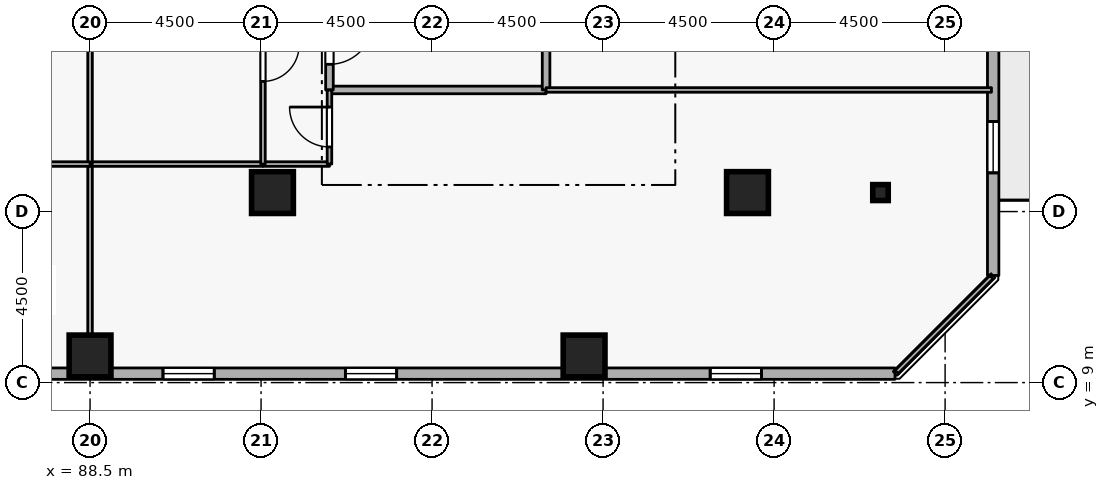
"""IFC4 building model, lengths in metres.
Left out: names, types, materials, properties, quantities, classifications, styles, units other than length and angle.
Written with IfcOpenShell. Run it as: python <this file> out.ifc"""

import sys

from ifc_helpers import new_model, si_unit, direction, frame, frame_2d, origin, origin_2d, place, context, subcontext, project, spatial, rectangle, i_section, extrude, element, fill, save


model = new_model("IFC4")
c1 = context("Model", 3, precision=1e-05, world=origin(), true_north=direction((0.0, 1.0)))
c2 = subcontext(c1, "Body", "Model", "MODEL_VIEW")
j1 = project(units=[si_unit("LENGTHUNIT", "METRE"), si_unit("PLANEANGLEUNIT", "RADIAN")], contexts=[c1])
p1 = place(None, origin())
s1 = spatial("IfcSite", under=j1, at=p1, CompositionType="ELEMENT")
p2 = place(p1, origin())
s2 = spatial("IfcBuilding", under=s1, at=p2, CompositionType="ELEMENT")
p3 = place(p2, frame((0.0, 0.0, 170.7)))
s3 = spatial("IfcBuildingStorey", under=s2, at=p3, CompositionType="ELEMENT", Elevation=170.7)
for number, where, z_axis, x_axis in (
    (1, (105.8, 14.0, 0.0), (0.0, 0.0, 1.0), (1.0, 0.0, 0.0)),
    (2, (101.5, 9.7, 0.0), (0.0, 0.0, 1.0), (1.0, 0.0, 0.0)),
    (3, (88.5, 9.7, 0.0), (0.0, 0.0, 1.0), (1.0, 0.0, 0.0)),
    (4, (93.3, 14.0, 0.0), (0.0, 0.0, 1.0), (1.0, 0.0, 0.0)),
):
    element("IfcColumn", number, at=place(p3, frame(where, z_axis=z_axis, x_axis=x_axis)), inside=s3, PredefinedType="COLUMN", context=c2, shape_type="SweptSolid", body=[
        extrude(rectangle(XDim=1.1, YDim=1.1, at=origin_2d()), origin(), (0.0, 0.0, 1.0), 3.6),
    ])
p4 = place(p3, frame((109.3, 14.0, 0.0), z_axis=(0.0, 0.0, 1.0), x_axis=(1.0, 0.0, 0.0)))
e5 = element("IfcColumn", 5, at=p4, inside=s3, PredefinedType="COLUMN", context=c2, shape_type="SweptSolid", body=[
    extrude(i_section(OverallWidth=0.407, OverallDepth=0.419, WebThickness=0.031, FlangeThickness=0.049, FilletRadius=0.015, at=origin_2d()), origin(), (0.0, 0.0, 1.0), 3.6),
])
p5 = place(p3, frame((73.319, 9.235, 0.0), z_axis=(0.0, 0.0, 1.0), x_axis=(1.0, 0.0, 0.0)))
e6 = element("IfcWall", 6, at=p5, inside=s3, PredefinedType="STANDARD", context=c2, shape_type="SweptSolid", body=[
    extrude(rectangle(XDim=36.363, YDim=0.3, at=frame_2d((18.181, 0.0))), origin(), (0.0, 0.0, 1.0), 2.22),
])
p6 = place(p5, frame((7.5, 0.0, 0.72)))
e7 = element("IfcOpeningElement", 7, at=p6, cuts=e6, PredefinedType="OPENING", context=c2, shape_type="SweptSolid", body=[
    extrude(rectangle(XDim=1.35, YDim=1.05, at=frame_2d((0.675, 0.525))), frame((0.0, 0.16, 0.0), z_axis=(0.0, -1.0, 0.0), x_axis=(1.0, 0.0, 0.0)), (0.0, 0.0, 1.0), 0.32),
])
p7 = place(p5, frame((12.3, 0.0, 0.72)))
e8 = element("IfcOpeningElement", 8, at=p7, cuts=e6, PredefinedType="OPENING", context=c2, shape_type="SweptSolid", body=[
    extrude(rectangle(XDim=1.35, YDim=1.05, at=frame_2d((0.675, 0.525))), frame((0.0, 0.16, 0.0), z_axis=(0.0, -1.0, 0.0), x_axis=(1.0, 0.0, 0.0)), (0.0, 0.0, 1.0), 0.32),
])
p8 = place(p5, frame((17.1, 0.0, 0.72)))
e9 = element("IfcOpeningElement", 9, at=p8, cuts=e6, PredefinedType="OPENING", context=c2, shape_type="SweptSolid", body=[
    extrude(rectangle(XDim=1.35, YDim=1.05, at=frame_2d((0.675, 0.525))), frame((0.0, 0.16, 0.0), z_axis=(0.0, -1.0, 0.0), x_axis=(1.0, 0.0, 0.0)), (0.0, 0.0, 1.0), 0.32),
])
p9 = place(p5, frame((21.9, 0.0, 0.72)))
e10 = element("IfcOpeningElement", 10, at=p9, cuts=e6, PredefinedType="OPENING", context=c2, shape_type="SweptSolid", body=[
    extrude(rectangle(XDim=1.35, YDim=1.05, at=frame_2d((0.675, 0.525))), frame((0.0, 0.16, 0.0), z_axis=(0.0, -1.0, 0.0), x_axis=(1.0, 0.0, 0.0)), (0.0, 0.0, 1.0), 0.32),
])
p10 = place(p5, frame((31.5, 0.0, 0.72)))
e11 = element("IfcOpeningElement", 11, at=p10, cuts=e6, PredefinedType="OPENING", context=c2, shape_type="SweptSolid", body=[
    extrude(rectangle(XDim=1.35, YDim=1.05, at=frame_2d((0.675, 0.525))), frame((0.0, 0.16, 0.0), z_axis=(0.0, -1.0, 0.0), x_axis=(1.0, 0.0, 0.0)), (0.0, 0.0, 1.0), 0.32),
])
p11 = place(p3, frame((112.265, 11.819, 0.0), z_axis=(0.0, 0.0, 1.0), x_axis=(0.0, 1.0, 0.0)))
e12 = element("IfcWall", 12, at=p11, inside=s3, PredefinedType="STANDARD", context=c2, shape_type="SweptSolid", body=[
    extrude(rectangle(XDim=36.363, YDim=0.3, at=frame_2d((18.181, 0.0))), origin(), (0.0, 0.0, 1.0), 2.22),
])
p12 = place(p11, frame((23.581, 0.0, 0.0)))
e13 = element("IfcOpeningElement", 13, at=p12, cuts=e12, PredefinedType="OPENING", context=c2, shape_type="SweptSolid", body=[
    extrude(rectangle(XDim=1.0, YDim=2.08, at=frame_2d((0.5, 1.04))), frame((0.0, 0.16, 0.0), z_axis=(0.0, -1.0, 0.0), x_axis=(1.0, 0.0, 0.0)), (0.0, 0.0, 1.0), 0.32),
])
p13 = place(p11, frame((2.7, 0.0, 0.72)))
e14 = element("IfcOpeningElement", 14, at=p13, cuts=e12, PredefinedType="OPENING", context=c2, shape_type="SweptSolid", body=[
    extrude(rectangle(XDim=1.35, YDim=1.05, at=frame_2d((0.675, 0.525))), frame((0.0, 0.16, 0.0), z_axis=(0.0, -1.0, 0.0), x_axis=(1.0, 0.0, 0.0)), (0.0, 0.0, 1.0), 0.32),
])
p14 = place(p11, frame((7.5, 0.0, 0.72)))
e15 = element("IfcOpeningElement", 15, at=p14, cuts=e12, PredefinedType="OPENING", context=c2, shape_type="SweptSolid", body=[
    extrude(rectangle(XDim=1.35, YDim=1.05, at=frame_2d((0.675, 0.525))), frame((0.0, 0.16, 0.0), z_axis=(0.0, -1.0, 0.0), x_axis=(1.0, 0.0, 0.0)), (0.0, 0.0, 1.0), 0.32),
])
p15 = place(p11, frame((12.3, 0.0, 0.72)))
e16 = element("IfcOpeningElement", 16, at=p15, cuts=e12, PredefinedType="OPENING", context=c2, shape_type="SweptSolid", body=[
    extrude(rectangle(XDim=1.35, YDim=1.05, at=frame_2d((0.675, 0.525))), frame((0.0, 0.16, 0.0), z_axis=(0.0, -1.0, 0.0), x_axis=(1.0, 0.0, 0.0)), (0.0, 0.0, 1.0), 0.32),
])
p16 = place(p11, frame((17.1, 0.0, 0.72)))
e17 = element("IfcOpeningElement", 17, at=p16, cuts=e12, PredefinedType="OPENING", context=c2, shape_type="SweptSolid", body=[
    extrude(rectangle(XDim=1.35, YDim=1.05, at=frame_2d((0.675, 0.525))), frame((0.0, 0.16, 0.0), z_axis=(0.0, -1.0, 0.0), x_axis=(1.0, 0.0, 0.0)), (0.0, 0.0, 1.0), 0.32),
])
p17 = place(p11, frame((26.7, 0.0, 0.72)))
e18 = element("IfcOpeningElement", 18, at=p17, cuts=e12, PredefinedType="OPENING", context=c2, shape_type="SweptSolid", body=[
    extrude(rectangle(XDim=1.35, YDim=1.05, at=frame_2d((0.675, 0.525))), frame((0.0, 0.16, 0.0), z_axis=(0.0, -1.0, 0.0), x_axis=(1.0, 0.0, 0.0)), (0.0, 0.0, 1.0), 0.32),
])
p18 = place(p11, frame((31.5, 0.0, 0.72)))
e19 = element("IfcOpeningElement", 19, at=p18, cuts=e12, PredefinedType="OPENING", context=c2, shape_type="SweptSolid", body=[
    extrude(rectangle(XDim=1.35, YDim=1.05, at=frame_2d((0.675, 0.525))), frame((0.0, 0.16, 0.0), z_axis=(0.0, -1.0, 0.0), x_axis=(1.0, 0.0, 0.0)), (0.0, 0.0, 1.0), 0.32),
])
p19 = place(p3, frame((94.8, 16.7, 0.0), z_axis=(0.0, 0.0, 1.0), x_axis=(1.0, 0.0, 0.0)))
e20 = element("IfcWall", 20, at=p19, inside=s3, PredefinedType="STANDARD", context=c2, shape_type="SweptSolid", body=[
    extrude(rectangle(XDim=5.7, YDim=0.2, at=frame_2d((2.85, 0.0))), origin(), (0.0, 0.0, 1.0), 3.26),
])
p20 = place(p3, frame((100.5, 16.7, 0.0), z_axis=(0.0, 0.0, 1.0), x_axis=(0.0, 1.0, 0.0)))
e21 = element("IfcWall", 21, at=p20, inside=s3, PredefinedType="STANDARD", context=c2, shape_type="SweptSolid", body=[
    extrude(rectangle(XDim=2.5, YDim=0.2, at=frame_2d((1.25, 0.0))), origin(), (0.0, 0.0, 1.0), 3.26),
])
p21 = place(p3, frame((94.8, 19.2, 0.0), z_axis=(0.0, 0.0, 1.0), x_axis=(0.0, -1.0, 0.0)))
e22 = element("IfcWall", 22, at=p21, inside=s3, PredefinedType="STANDARD", context=c2, shape_type="SweptSolid", body=[
    extrude(rectangle(XDim=2.5, YDim=0.2, at=frame_2d((1.25, 0.0))), origin(), (0.0, 0.0, 1.0), 3.26),
])
p22 = place(p21, frame((0.675, 0.0, 0.0)))
e23 = element("IfcOpeningElement", 23, at=p22, cuts=e22, PredefinedType="OPENING", context=c2, shape_type="SweptSolid", body=[
    extrude(rectangle(XDim=1.15, YDim=2.1, at=frame_2d((0.575, 1.05))), frame((0.0, 0.11, 0.0), z_axis=(0.0, -1.0, 0.0), x_axis=(1.0, 0.0, 0.0)), (0.0, 0.0, 1.0), 0.22),
])
p23 = place(p3, frame((88.5, 9.28, 0.0), z_axis=(0.0, 0.0, 1.0), x_axis=(0.0, 1.0, 0.0)))
e24 = element("IfcWall", 24, at=p23, inside=s3, PredefinedType="PARTITIONING", context=c2, shape_type="SweptSolid", body=[
    extrude(rectangle(XDim=5.47, YDim=0.12, at=frame_2d((2.735, 0.0))), origin(), (0.0, 0.0, 1.0), 2.802),
])
p24 = place(p3, frame((88.5, 14.75, 0.0), z_axis=(0.0, 0.0, 1.0), x_axis=(1.0, 0.0, 0.0)))
e25 = element("IfcWall", 25, at=p24, inside=s3, PredefinedType="PARTITIONING", context=c2, shape_type="SweptSolid", body=[
    extrude(rectangle(XDim=4.55, YDim=0.12, at=frame_2d((2.275, 0.0))), origin(), (0.0, 0.0, 1.0), 3.26),
])
p25 = place(p3, frame((93.05, 14.75, 0.0), z_axis=(0.0, 0.0, 1.0), x_axis=(1.0, 0.0, 0.0)))
e26 = element("IfcWall", 26, at=p25, inside=s3, PredefinedType="PARTITIONING", context=c2, shape_type="SweptSolid", body=[
    extrude(rectangle(XDim=1.75, YDim=0.12, at=frame_2d((0.875, 0.0))), origin(), (0.0, 0.0, 1.0), 3.26),
])
p26 = place(p3, frame((94.8, 14.75, 0.0), z_axis=(0.0, 0.0, 1.0), x_axis=(0.0, 1.0, 0.0)))
e27 = element("IfcWall", 27, at=p26, inside=s3, PredefinedType="PARTITIONING", context=c2, shape_type="SweptSolid", body=[
    extrude(rectangle(XDim=1.95, YDim=0.12, at=frame_2d((0.975, 0.0))), origin(), (0.0, 0.0, 1.0), 3.26),
])
p27 = place(p26, frame((0.45, 0.0, 0.0)))
e28 = element("IfcOpeningElement", 28, at=p27, cuts=e27, PredefinedType="OPENING", context=c2, shape_type="SweptSolid", body=[
    extrude(rectangle(XDim=1.05, YDim=2.1, at=frame_2d((0.525, 1.05))), frame((0.0, 0.07, 0.0), z_axis=(0.0, -1.0, 0.0), x_axis=(1.0, 0.0, 0.0)), (0.0, 0.0, 1.0), 0.14),
])
p28 = place(p3, frame((100.5, 16.7, 0.0), z_axis=(0.0, 0.0, 1.0), x_axis=(1.0, 0.0, 0.0)))
e29 = element("IfcWall", 29, at=p28, inside=s3, PredefinedType="PARTITIONING", context=c2, shape_type="SweptSolid", body=[
    extrude(rectangle(XDim=11.72, YDim=0.12, at=frame_2d((5.86, 0.0))), origin(), (0.0, 0.0, 1.0), 3.26),
])
p29 = place(p3, frame((112.22, 11.775, 0.0), z_axis=(0.0, 0.0, 1.0), x_axis=(-0.707106781187, -0.707106781187, 0.0)))
e30 = element("IfcWall", 30, at=p29, inside=s3, PredefinedType="PARTITIONING", context=c2, shape_type="SweptSolid", body=[
    extrude(rectangle(XDim=3.528, YDim=0.12, at=frame_2d((1.764, 0.0))), origin(), (0.0, 0.0, 1.0), 3.26),
])
p30 = place(p3, frame((88.5, 14.75, 0.0), z_axis=(0.0, 0.0, 1.0), x_axis=(0.0, 1.0, 0.0)))
e31 = element("IfcWall", 31, at=p30, inside=s3, PredefinedType="PARTITIONING", context=c2, shape_type="SweptSolid", body=[
    extrude(rectangle(XDim=5.3, YDim=0.12, at=frame_2d((2.65, 0.0))), origin(), (0.0, 0.0, 1.0), 2.802),
])
p31 = place(p3, frame((93.05, 20.05, 0.0), z_axis=(0.0, 0.0, 1.0), x_axis=(0.0, -1.0, 0.0)))
e32 = element("IfcWall", 32, at=p31, inside=s3, PredefinedType="PARTITIONING", context=c2, shape_type="SweptSolid", body=[
    extrude(rectangle(XDim=5.3, YDim=0.12, at=frame_2d((2.65, 0.0))), origin(), (0.0, 0.0, 1.0), 3.26),
])
p32 = place(p31, frame((2.175, 0.0, 0.0)))
e33 = element("IfcOpeningElement", 33, at=p32, cuts=e32, PredefinedType="OPENING", context=c2, shape_type="SweptSolid", body=[
    extrude(rectangle(XDim=0.95, YDim=2.1, at=frame_2d((0.475, 1.05))), frame((0.0, 0.07, 0.0), z_axis=(0.0, -1.0, 0.0), x_axis=(1.0, 0.0, 0.0)), (0.0, 0.0, 1.0), 0.14),
])
p33 = place(p3, frame((88.5, 14.75, 0.0), z_axis=(0.0, 0.0, 1.0), x_axis=(-1.0, 0.0, 0.0)))
e34 = element("IfcWall", 34, at=p33, inside=s3, PredefinedType="PARTITIONING", context=c2, shape_type="SweptSolid", body=[
    extrude(rectangle(XDim=2.3, YDim=0.12, at=frame_2d((1.15, 0.0))), origin(), (0.0, 0.0, 1.0), 3.26),
])
p34 = place(p8, origin())
e35 = element("IfcWindow", 35, at=p34, inside=s3, PartitioningType="SINGLE_PANEL", PredefinedType="WINDOW", context=c2, shape_type="SweptSolid", body=[
    extrude(rectangle(XDim=1.35, YDim=1.05, at=frame_2d((0.675, 0.525))), frame((0.0, 0.03, 0.0), z_axis=(0.0, -1.0, 0.0), x_axis=(1.0, 0.0, 0.0)), (0.0, 0.0, 1.0), 0.06),
])
fill(e9, e35)
p35 = place(p9, origin())
e36 = element("IfcWindow", 36, at=p35, inside=s3, PartitioningType="SINGLE_PANEL", PredefinedType="WINDOW", context=c2, shape_type="SweptSolid", body=[
    extrude(rectangle(XDim=1.35, YDim=1.05, at=frame_2d((0.675, 0.525))), frame((0.0, 0.03, 0.0), z_axis=(0.0, -1.0, 0.0), x_axis=(1.0, 0.0, 0.0)), (0.0, 0.0, 1.0), 0.06),
])
fill(e10, e36)
p36 = place(p10, origin())
e37 = element("IfcWindow", 37, at=p36, inside=s3, PartitioningType="SINGLE_PANEL", PredefinedType="WINDOW", context=c2, shape_type="SweptSolid", body=[
    extrude(rectangle(XDim=1.35, YDim=1.05, at=frame_2d((0.675, 0.525))), frame((0.0, 0.03, 0.0), z_axis=(0.0, -1.0, 0.0), x_axis=(1.0, 0.0, 0.0)), (0.0, 0.0, 1.0), 0.06),
])
fill(e11, e37)
p37 = place(p13, origin())
e38 = element("IfcWindow", 38, at=p37, inside=s3, PartitioningType="SINGLE_PANEL", PredefinedType="WINDOW", context=c2, shape_type="SweptSolid", body=[
    extrude(rectangle(XDim=1.35, YDim=1.05, at=frame_2d((0.675, 0.525))), frame((0.0, 0.03, 0.0), z_axis=(0.0, -1.0, 0.0), x_axis=(1.0, 0.0, 0.0)), (0.0, 0.0, 1.0), 0.06),
])
fill(e14, e38)
p38 = place(p22, origin())
e39 = element("IfcDoor", 39, at=p38, inside=s3, OperationType="SINGLE_SWING_LEFT", PredefinedType="DOOR", context=c2, shape_type="SweptSolid", body=[
    extrude(rectangle(XDim=1.15, YDim=2.1, at=frame_2d((0.575, 1.05))), frame((0.0, 0.025, 0.0), z_axis=(0.0, -1.0, 0.0), x_axis=(1.0, 0.0, 0.0)), (0.0, 0.0, 1.0), 0.05),
])
fill(e23, e39)
p39 = place(p27, origin())
e40 = element("IfcDoor", 40, at=p39, inside=s3, OperationType="SINGLE_SWING_RIGHT", PredefinedType="DOOR", context=c2, shape_type="SweptSolid", body=[
    extrude(rectangle(XDim=1.05, YDim=2.1, at=frame_2d((0.525, 1.05))), frame((0.0, 0.025, 0.0), z_axis=(0.0, -1.0, 0.0), x_axis=(1.0, 0.0, 0.0)), (0.0, 0.0, 1.0), 0.05),
])
fill(e28, e40)
p40 = place(p32, origin())
e41 = element("IfcDoor", 41, at=p40, inside=s3, OperationType="SINGLE_SWING_LEFT", PredefinedType="DOOR", context=c2, shape_type="SweptSolid", body=[
    extrude(rectangle(XDim=0.95, YDim=2.1, at=frame_2d((0.475, 1.05))), frame((0.0, 0.025, 0.0), z_axis=(0.0, -1.0, 0.0), x_axis=(1.0, 0.0, 0.0)), (0.0, 0.0, 1.0), 0.05),
])
fill(e33, e41)
save(model, sys.argv[1])
